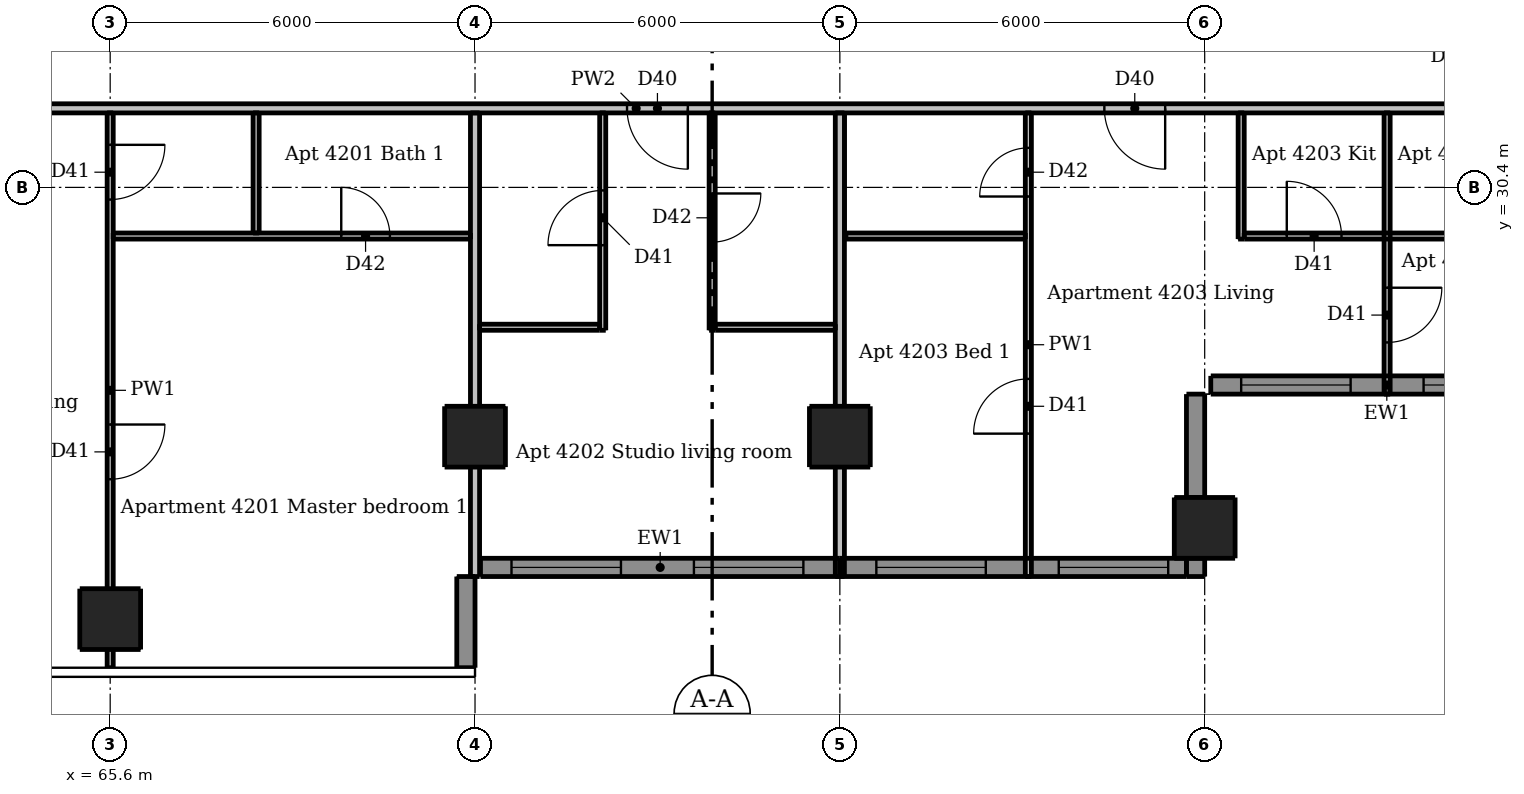
"""IFC4 building model, lengths in metres.
Left out: names, types, materials, properties, quantities, classifications, styles, units other than length and angle.
Written with IfcOpenShell. Run it as: python <this file> out.ifc"""

import sys

from ifc_helpers import new_model, si_unit, direction, frame, frame_2d, origin, origin_2d, place, context, subcontext, project, spatial, rectangle, extrude, element, fill, save


model = new_model("IFC4")
c1 = context("Model", 3, precision=1e-05, world=origin(), true_north=direction((0.0, 1.0)))
c2 = subcontext(c1, "Body", "Model", "MODEL_VIEW")
j1 = project(units=[si_unit("LENGTHUNIT", "METRE"), si_unit("PLANEANGLEUNIT", "RADIAN")], contexts=[c1])
p1 = place(None, origin())
s1 = spatial("IfcSite", under=j1, at=p1, CompositionType="ELEMENT")
p2 = place(p1, origin())
s2 = spatial("IfcBuilding", under=s1, at=p2, CompositionType="ELEMENT")
p3 = place(p2, frame((0.0, 0.0, 158.2)))
s3 = spatial("IfcBuildingStorey", under=s2, at=p3, CompositionType="ELEMENT", Elevation=158.2)
for number, where, z_axis, x_axis in (
    (1, (65.6, 23.3, 0.0), (0.0, 0.0, 1.0), (1.0, 0.0, 0.0)),
    (2, (71.6, 26.3, 0.0), (0.0, 0.0, 1.0), (1.0, 0.0, 0.0)),
    (3, (77.6, 26.3, 0.0), (0.0, 0.0, 1.0), (1.0, 0.0, 0.0)),
    (4, (83.6, 24.8, 0.0), (0.0, 0.0, 1.0), (1.0, 0.0, 0.0)),
):
    element("IfcColumn", number, at=place(p3, frame(where, z_axis=z_axis, x_axis=x_axis)), inside=s3, PredefinedType="COLUMN", context=c2, shape_type="SweptSolid", body=[
        extrude(rectangle(XDim=1.0, YDim=1.0, at=origin_2d()), origin(), (0.0, 0.0, 1.0), 3.05),
    ])
p4 = place(p3, frame((71.45, 22.5, 0.0), z_axis=(0.0, 0.0, 1.0), x_axis=(0.0, 1.0, 0.0)))
e5 = element("IfcWall", 5, at=p4, inside=s3, PredefinedType="SOLIDWALL", context=c2, shape_type="SweptSolid", body=[
    extrude(rectangle(XDim=1.5, YDim=0.3, at=frame_2d((0.75, 0.0))), origin(), (0.0, 0.0, 1.0), 3.05),
])
p5 = place(p3, frame((83.45, 24.0, 0.0), z_axis=(0.0, 0.0, 1.0), x_axis=(0.0, 1.0, 0.0)))
e6 = element("IfcWall", 6, at=p5, inside=s3, PredefinedType="SOLIDWALL", context=c2, shape_type="SweptSolid", body=[
    extrude(rectangle(XDim=0.3, YDim=0.3, at=frame_2d((0.15, 0.0))), origin(), (0.0, 0.0, 1.0), 3.05),
])
p6 = place(p3, frame((83.45, 25.3, 0.0), z_axis=(0.0, 0.0, 1.0), x_axis=(0.0, 1.0, 0.0)))
e7 = element("IfcWall", 7, at=p6, inside=s3, PredefinedType="SOLIDWALL", context=c2, shape_type="SweptSolid", body=[
    extrude(rectangle(XDim=1.7, YDim=0.3, at=frame_2d((0.85, 0.0))), origin(), (0.0, 0.0, 1.0), 3.05),
])
p7 = place(p3, frame((71.69, 24.15, 0.0), z_axis=(0.0, 0.0, 1.0), x_axis=(1.0, 0.0, 0.0)))
e8 = element("IfcWall", 8, at=p7, inside=s3, PredefinedType="SOLIDWALL", context=c2, shape_type="SweptSolid", body=[
    extrude(rectangle(XDim=5.91, YDim=0.3, at=frame_2d((2.955, 0.0))), origin(), (0.0, 0.0, 1.0), 3.05),
])
p8 = place(p7, frame((0.51, 0.0, 0.15)))
e9 = element("IfcOpeningElement", 9, at=p8, cuts=e8, PredefinedType="OPENING", context=c2, shape_type="SweptSolid", body=[
    extrude(rectangle(XDim=1.8, YDim=2.1, at=frame_2d((0.9, 1.05))), frame((0.0, 0.16, 0.0), z_axis=(0.0, -1.0, 0.0), x_axis=(1.0, 0.0, 0.0)), (0.0, 0.0, 1.0), 0.32),
])
p9 = place(p7, frame((3.51, 0.0, 0.15)))
e10 = element("IfcOpeningElement", 10, at=p9, cuts=e8, PredefinedType="OPENING", context=c2, shape_type="SweptSolid", body=[
    extrude(rectangle(XDim=1.8, YDim=2.1, at=frame_2d((0.9, 1.05))), frame((0.0, 0.16, 0.0), z_axis=(0.0, -1.0, 0.0), x_axis=(1.0, 0.0, 0.0)), (0.0, 0.0, 1.0), 0.32),
])
p10 = place(p3, frame((77.6, 24.15, 0.0), z_axis=(0.0, 0.0, 1.0), x_axis=(1.0, 0.0, 0.0)))
e11 = element("IfcWall", 11, at=p10, inside=s3, PredefinedType="SOLIDWALL", context=c2, shape_type="SweptSolid", body=[
    extrude(rectangle(XDim=5.7, YDim=0.3, at=frame_2d((2.85, 0.0))), origin(), (0.0, 0.0, 1.0), 3.05),
])
p11 = place(p10, frame((0.6, 0.0, 0.15)))
e12 = element("IfcOpeningElement", 12, at=p11, cuts=e11, PredefinedType="OPENING", context=c2, shape_type="SweptSolid", body=[
    extrude(rectangle(XDim=1.8, YDim=2.1, at=frame_2d((0.9, 1.05))), frame((0.0, 0.16, 0.0), z_axis=(0.0, -1.0, 0.0), x_axis=(1.0, 0.0, 0.0)), (0.0, 0.0, 1.0), 0.32),
])
p12 = place(p10, frame((3.6, 0.0, 0.15)))
e13 = element("IfcOpeningElement", 13, at=p12, cuts=e11, PredefinedType="OPENING", context=c2, shape_type="SweptSolid", body=[
    extrude(rectangle(XDim=1.8, YDim=2.1, at=frame_2d((0.9, 1.05))), frame((0.0, 0.16, 0.0), z_axis=(0.0, -1.0, 0.0), x_axis=(1.0, 0.0, 0.0)), (0.0, 0.0, 1.0), 0.32),
])
p13 = place(p3, frame((83.7, 27.15, 0.0), z_axis=(0.0, 0.0, 1.0), x_axis=(1.0, 0.0, 0.0)))
e14 = element("IfcWall", 14, at=p13, inside=s3, PredefinedType="SOLIDWALL", context=c2, shape_type="SweptSolid", body=[
    extrude(rectangle(XDim=5.79, YDim=0.3, at=frame_2d((2.895, 0.0))), origin(), (0.0, 0.0, 1.0), 3.05),
])
p14 = place(p13, frame((0.5, 0.0, 0.15)))
e15 = element("IfcOpeningElement", 15, at=p14, cuts=e14, PredefinedType="OPENING", context=c2, shape_type="SweptSolid", body=[
    extrude(rectangle(XDim=1.8, YDim=2.1, at=frame_2d((0.9, 1.05))), frame((0.0, 0.16, 0.0), z_axis=(0.0, -1.0, 0.0), x_axis=(1.0, 0.0, 0.0)), (0.0, 0.0, 1.0), 0.32),
])
p15 = place(p13, frame((3.5, 0.0, 0.15)))
e16 = element("IfcOpeningElement", 16, at=p15, cuts=e14, PredefinedType="OPENING", context=c2, shape_type="SweptSolid", body=[
    extrude(rectangle(XDim=1.8, YDim=2.1, at=frame_2d((0.9, 1.05))), frame((0.0, 0.16, 0.0), z_axis=(0.0, -1.0, 0.0), x_axis=(1.0, 0.0, 0.0)), (0.0, 0.0, 1.0), 0.32),
])
p16 = place(p3, frame((65.6, 31.625, 0.0), z_axis=(0.0, 0.0, 1.0), x_axis=(0.0, -1.0, 0.0)))
e17 = element("IfcWall", 17, at=p16, inside=s3, PredefinedType="PARTITIONING", context=c2, shape_type="SweptSolid", body=[
    extrude(rectangle(XDim=9.125, YDim=0.1, at=frame_2d((4.562, 0.0))), origin(), (0.0, 0.0, 1.0), 2.516),
])
p17 = place(p16, frame((0.525, 0.0, 0.0)))
e18 = element("IfcOpeningElement", 18, at=p17, cuts=e17, PredefinedType="OPENING", context=c2, shape_type="SweptSolid", body=[
    extrude(rectangle(XDim=0.9, YDim=2.1, at=frame_2d((0.45, 1.05))), frame((0.0, 0.06, 0.0), z_axis=(0.0, -1.0, 0.0), x_axis=(1.0, 0.0, 0.0)), (0.0, 0.0, 1.0), 0.12),
])
p18 = place(p16, frame((5.125, 0.0, 0.0)))
e19 = element("IfcOpeningElement", 19, at=p18, cuts=e17, PredefinedType="OPENING", context=c2, shape_type="SweptSolid", body=[
    extrude(rectangle(XDim=0.9, YDim=2.1, at=frame_2d((0.45, 1.05))), frame((0.0, 0.06, 0.0), z_axis=(0.0, -1.0, 0.0), x_axis=(1.0, 0.0, 0.0)), (0.0, 0.0, 1.0), 0.12),
])
p19 = place(p3, frame((68.0, 29.65, 0.0), z_axis=(0.0, 0.0, 1.0), x_axis=(0.0, 1.0, 0.0)))
e20 = element("IfcWall", 20, at=p19, inside=s3, PredefinedType="PARTITIONING", context=c2, shape_type="SweptSolid", body=[
    extrude(rectangle(XDim=1.975, YDim=0.1, at=frame_2d((0.988, 0.0))), origin(), (0.0, 0.0, 1.0), 3.05),
])
p20 = place(p3, frame((73.7, 28.05, 0.0), z_axis=(0.0, 0.0, 1.0), x_axis=(0.0, 1.0, 0.0)))
e21 = element("IfcWall", 21, at=p20, inside=s3, PredefinedType="PARTITIONING", context=c2, shape_type="SweptSolid", body=[
    extrude(rectangle(XDim=3.575, YDim=0.1, at=frame_2d((1.788, 0.0))), origin(), (0.0, 0.0, 1.0), 3.05),
])
p21 = place(p20, frame((1.4, 0.0, 0.0)))
e22 = element("IfcOpeningElement", 22, at=p21, cuts=e21, PredefinedType="OPENING", context=c2, shape_type="SweptSolid", body=[
    extrude(rectangle(XDim=0.9, YDim=2.1, at=frame_2d((0.45, 1.05))), frame((0.0, 0.06, 0.0), z_axis=(0.0, -1.0, 0.0), x_axis=(1.0, 0.0, 0.0)), (0.0, 0.0, 1.0), 0.12),
])
p22 = place(p3, frame((75.5, 31.625, 0.0), z_axis=(0.0, 0.0, 1.0), x_axis=(0.0, -1.0, 0.0)))
e23 = element("IfcWall", 23, at=p22, inside=s3, PredefinedType="PARTITIONING", context=c2, shape_type="SweptSolid", body=[
    extrude(rectangle(XDim=3.575, YDim=0.1, at=frame_2d((1.788, 0.0))), origin(), (0.0, 0.0, 1.0), 3.05),
])
p23 = place(p22, frame((1.325, 0.0, 0.0)))
e24 = element("IfcOpeningElement", 24, at=p23, cuts=e23, PredefinedType="OPENING", context=c2, shape_type="SweptSolid", body=[
    extrude(rectangle(XDim=0.8, YDim=2.1, at=frame_2d((0.4, 1.05))), frame((0.0, 0.06, 0.0), z_axis=(0.0, -1.0, 0.0), x_axis=(1.0, 0.0, 0.0)), (0.0, 0.0, 1.0), 0.12),
])
p24 = place(p3, frame((80.7, 24.0, 0.0), z_axis=(0.0, 0.0, 1.0), x_axis=(0.0, 1.0, 0.0)))
e25 = element("IfcWall", 25, at=p24, inside=s3, PredefinedType="PARTITIONING", context=c2, shape_type="SweptSolid", body=[
    extrude(rectangle(XDim=7.625, YDim=0.1, at=frame_2d((3.812, 0.0))), origin(), (0.0, 0.0, 1.0), 3.05),
])
p25 = place(p24, frame((2.35, 0.0, 0.0)))
e26 = element("IfcOpeningElement", 26, at=p25, cuts=e25, PredefinedType="OPENING", context=c2, shape_type="SweptSolid", body=[
    extrude(rectangle(XDim=0.9, YDim=2.1, at=frame_2d((0.45, 1.05))), frame((0.0, 0.06, 0.0), z_axis=(0.0, -1.0, 0.0), x_axis=(1.0, 0.0, 0.0)), (0.0, 0.0, 1.0), 0.12),
])
p26 = place(p24, frame((6.25, 0.0, 0.0)))
e27 = element("IfcOpeningElement", 27, at=p26, cuts=e25, PredefinedType="OPENING", context=c2, shape_type="SweptSolid", body=[
    extrude(rectangle(XDim=0.8, YDim=2.1, at=frame_2d((0.4, 1.05))), frame((0.0, 0.06, 0.0), z_axis=(0.0, -1.0, 0.0), x_axis=(1.0, 0.0, 0.0)), (0.0, 0.0, 1.0), 0.12),
])
p27 = place(p3, frame((84.2, 29.55, 0.0), z_axis=(0.0, 0.0, 1.0), x_axis=(0.0, 1.0, 0.0)))
e28 = element("IfcWall", 28, at=p27, inside=s3, PredefinedType="PARTITIONING", context=c2, shape_type="SweptSolid", body=[
    extrude(rectangle(XDim=2.075, YDim=0.1, at=frame_2d((1.038, 0.0))), origin(), (0.0, 0.0, 1.0), 3.05),
])
p28 = place(p3, frame((86.6, 31.625, 0.0), z_axis=(0.0, 0.0, 1.0), x_axis=(0.0, -1.0, 0.0)))
e29 = element("IfcWall", 29, at=p28, inside=s3, PredefinedType="PARTITIONING", context=c2, shape_type="SweptSolid", body=[
    extrude(rectangle(XDim=4.625, YDim=0.1, at=frame_2d((2.312, 0.0))), origin(), (0.0, 0.0, 1.0), 3.05),
])
p29 = place(p28, frame((2.875, 0.0, 0.0)))
e30 = element("IfcOpeningElement", 30, at=p29, cuts=e29, PredefinedType="OPENING", context=c2, shape_type="SweptSolid", body=[
    extrude(rectangle(XDim=0.9, YDim=2.1, at=frame_2d((0.45, 1.05))), frame((0.0, 0.06, 0.0), z_axis=(0.0, -1.0, 0.0), x_axis=(1.0, 0.0, 0.0)), (0.0, 0.0, 1.0), 0.12),
])
p30 = place(p3, frame((65.65, 29.6, 0.0), z_axis=(0.0, 0.0, 1.0), x_axis=(1.0, 0.0, 0.0)))
e31 = element("IfcWall", 31, at=p30, inside=s3, PredefinedType="PARTITIONING", context=c2, shape_type="SweptSolid", body=[
    extrude(rectangle(XDim=5.875, YDim=0.1, at=frame_2d((2.938, 0.0))), origin(), (0.0, 0.0, 1.0), 3.05),
])
p31 = place(p30, frame((3.75, 0.0, 0.0)))
e32 = element("IfcOpeningElement", 32, at=p31, cuts=e31, PredefinedType="OPENING", context=c2, shape_type="SweptSolid", body=[
    extrude(rectangle(XDim=0.8, YDim=2.1, at=frame_2d((0.4, 1.05))), frame((0.0, 0.06, 0.0), z_axis=(0.0, -1.0, 0.0), x_axis=(1.0, 0.0, 0.0)), (0.0, 0.0, 1.0), 0.12),
])
p32 = place(p3, frame((77.7, 29.6, 0.0), z_axis=(0.0, 0.0, 1.0), x_axis=(1.0, 0.0, 0.0)))
e33 = element("IfcWall", 33, at=p32, inside=s3, PredefinedType="PARTITIONING", context=c2, shape_type="SweptSolid", body=[
    extrude(rectangle(XDim=2.95, YDim=0.1, at=frame_2d((1.475, 0.0))), origin(), (0.0, 0.0, 1.0), 3.05),
])
p33 = place(p3, frame((84.25, 29.6, 0.0), z_axis=(0.0, 0.0, 1.0), x_axis=(1.0, 0.0, 0.0)))
e34 = element("IfcWall", 34, at=p33, inside=s3, PredefinedType="PARTITIONING", context=c2, shape_type="SweptSolid", body=[
    extrude(rectangle(XDim=5.275, YDim=0.1, at=frame_2d((2.637, 0.0))), origin(), (0.0, 0.0, 1.0), 3.05),
])
p34 = place(p33, frame((0.7, 0.0, 0.0)))
e35 = element("IfcOpeningElement", 35, at=p34, cuts=e34, PredefinedType="OPENING", context=c2, shape_type="SweptSolid", body=[
    extrude(rectangle(XDim=0.9, YDim=2.1, at=frame_2d((0.45, 1.05))), frame((0.0, 0.06, 0.0), z_axis=(0.0, -1.0, 0.0), x_axis=(1.0, 0.0, 0.0)), (0.0, 0.0, 1.0), 0.12),
])
p35 = place(p33, frame((3.45, 0.0, 0.0)))
e36 = element("IfcOpeningElement", 36, at=p35, cuts=e34, PredefinedType="OPENING", context=c2, shape_type="SweptSolid", body=[
    extrude(rectangle(XDim=0.8, YDim=2.1, at=frame_2d((0.4, 1.05))), frame((0.0, 0.06, 0.0), z_axis=(0.0, -1.0, 0.0), x_axis=(1.0, 0.0, 0.0)), (0.0, 0.0, 1.0), 0.12),
])
for number, where, z_axis, x_axis in (
    (37, (71.675, 28.1, 0.0), (0.0, 0.0, 1.0), (1.0, 0.0, 0.0)),
    (38, (75.55, 28.1, 0.0), (0.0, 0.0, 1.0), (1.0, 0.0, 0.0)),
):
    element("IfcWall", number, at=place(p3, frame(where, z_axis=z_axis, x_axis=x_axis)), inside=s3, PredefinedType="PARTITIONING", context=c2, shape_type="SweptSolid", body=[
        extrude(rectangle(XDim=1.975, YDim=0.1, at=frame_2d((0.987, 0.0))), origin(), (0.0, 0.0, 1.0), 3.05),
    ])
for number, where, z_axis, x_axis in (
    (39, (71.6, 24.0, 0.0), (0.0, 0.0, 1.0), (0.0, 1.0, 0.0)),
    (40, (77.6, 24.0, 0.0), (0.0, 0.0, 1.0), (0.0, 1.0, 0.0)),
):
    element("IfcWall", number, at=place(p3, frame(where, z_axis=z_axis, x_axis=x_axis)), inside=s3, PredefinedType="PARTITIONING", context=c2, shape_type="SweptSolid", body=[
        extrude(rectangle(XDim=7.625, YDim=0.15, at=frame_2d((3.812, 0.0))), origin(), (0.0, 0.0, 1.0), 2.59),
    ])
p36 = place(p3, frame((89.525, 31.7, 0.0), z_axis=(0.0, 0.0, 1.0), x_axis=(-1.0, 0.0, 0.0)))
e41 = element("IfcWall", 41, at=p36, inside=s3, PredefinedType="PARTITIONING", context=c2, shape_type="SweptSolid", body=[
    extrude(rectangle(XDim=30.55, YDim=0.15, at=frame_2d((15.275, 0.0))), origin(), (0.0, 0.0, 1.0), 3.05),
])
p37 = place(p36, frame((26.775, 0.0, 0.0)))
e42 = element("IfcOpeningElement", 42, at=p37, cuts=e41, PredefinedType="OPENING", context=c2, shape_type="SweptSolid", body=[
    extrude(rectangle(XDim=1.0, YDim=2.1, at=frame_2d((0.5, 1.05))), frame((0.0, 0.085, 0.0), z_axis=(0.0, -1.0, 0.0), x_axis=(1.0, 0.0, 0.0)), (0.0, 0.0, 1.0), 0.17),
])
p38 = place(p36, frame((14.425, 0.0, 0.0)))
e43 = element("IfcOpeningElement", 43, at=p38, cuts=e41, PredefinedType="OPENING", context=c2, shape_type="SweptSolid", body=[
    extrude(rectangle(XDim=1.0, YDim=2.1, at=frame_2d((0.5, 1.05))), frame((0.0, 0.085, 0.0), z_axis=(0.0, -1.0, 0.0), x_axis=(1.0, 0.0, 0.0)), (0.0, 0.0, 1.0), 0.17),
])
p39 = place(p36, frame((6.575, 0.0, 0.0)))
e44 = element("IfcOpeningElement", 44, at=p39, cuts=e41, PredefinedType="OPENING", context=c2, shape_type="SweptSolid", body=[
    extrude(rectangle(XDim=1.0, YDim=2.1, at=frame_2d((0.5, 1.05))), frame((0.0, 0.085, 0.0), z_axis=(0.0, -1.0, 0.0), x_axis=(1.0, 0.0, 0.0)), (0.0, 0.0, 1.0), 0.17),
])
p40 = place(p8, origin())
e45 = element("IfcWindow", 45, at=p40, inside=s3, PartitioningType="DOUBLE_PANEL_VERTICAL", PredefinedType="WINDOW", context=c2, shape_type="SweptSolid", body=[
    extrude(rectangle(XDim=1.8, YDim=2.1, at=frame_2d((0.9, 1.05))), frame((0.0, 0.03, 0.0), z_axis=(0.0, -1.0, 0.0), x_axis=(1.0, 0.0, 0.0)), (0.0, 0.0, 1.0), 0.06),
])
fill(e9, e45)
p41 = place(p9, origin())
e46 = element("IfcWindow", 46, at=p41, inside=s3, PartitioningType="DOUBLE_PANEL_VERTICAL", PredefinedType="WINDOW", context=c2, shape_type="SweptSolid", body=[
    extrude(rectangle(XDim=1.8, YDim=2.1, at=frame_2d((0.9, 1.05))), frame((0.0, 0.03, 0.0), z_axis=(0.0, -1.0, 0.0), x_axis=(1.0, 0.0, 0.0)), (0.0, 0.0, 1.0), 0.06),
])
fill(e10, e46)
p42 = place(p11, origin())
e47 = element("IfcWindow", 47, at=p42, inside=s3, PartitioningType="DOUBLE_PANEL_VERTICAL", PredefinedType="WINDOW", context=c2, shape_type="SweptSolid", body=[
    extrude(rectangle(XDim=1.8, YDim=2.1, at=frame_2d((0.9, 1.05))), frame((0.0, 0.03, 0.0), z_axis=(0.0, -1.0, 0.0), x_axis=(1.0, 0.0, 0.0)), (0.0, 0.0, 1.0), 0.06),
])
fill(e12, e47)
p43 = place(p12, origin())
e48 = element("IfcWindow", 48, at=p43, inside=s3, PartitioningType="DOUBLE_PANEL_VERTICAL", PredefinedType="WINDOW", context=c2, shape_type="SweptSolid", body=[
    extrude(rectangle(XDim=1.8, YDim=2.1, at=frame_2d((0.9, 1.05))), frame((0.0, 0.03, 0.0), z_axis=(0.0, -1.0, 0.0), x_axis=(1.0, 0.0, 0.0)), (0.0, 0.0, 1.0), 0.06),
])
fill(e13, e48)
p44 = place(p14, origin())
e49 = element("IfcWindow", 49, at=p44, inside=s3, PartitioningType="DOUBLE_PANEL_VERTICAL", PredefinedType="WINDOW", context=c2, shape_type="SweptSolid", body=[
    extrude(rectangle(XDim=1.8, YDim=2.1, at=frame_2d((0.9, 1.05))), frame((0.0, 0.03, 0.0), z_axis=(0.0, -1.0, 0.0), x_axis=(1.0, 0.0, 0.0)), (0.0, 0.0, 1.0), 0.06),
])
fill(e15, e49)
p45 = place(p15, origin())
e50 = element("IfcWindow", 50, at=p45, inside=s3, PartitioningType="DOUBLE_PANEL_VERTICAL", PredefinedType="WINDOW", context=c2, shape_type="SweptSolid", body=[
    extrude(rectangle(XDim=1.8, YDim=2.1, at=frame_2d((0.9, 1.05))), frame((0.0, 0.03, 0.0), z_axis=(0.0, -1.0, 0.0), x_axis=(1.0, 0.0, 0.0)), (0.0, 0.0, 1.0), 0.06),
])
fill(e16, e50)
p46 = place(p17, origin())
e51 = element("IfcDoor", 51, at=p46, inside=s3, OperationType="SINGLE_SWING_LEFT", PredefinedType="DOOR", context=c2, shape_type="SweptSolid", body=[
    extrude(rectangle(XDim=0.9, YDim=2.1, at=frame_2d((0.45, 1.05))), frame((0.0, 0.025, 0.0), z_axis=(0.0, -1.0, 0.0), x_axis=(1.0, 0.0, 0.0)), (0.0, 0.0, 1.0), 0.05),
])
fill(e18, e51)
p47 = place(p18, origin())
e52 = element("IfcDoor", 52, at=p47, inside=s3, OperationType="SINGLE_SWING_LEFT", PredefinedType="DOOR", context=c2, shape_type="SweptSolid", body=[
    extrude(rectangle(XDim=0.9, YDim=2.1, at=frame_2d((0.45, 1.05))), frame((0.0, 0.025, 0.0), z_axis=(0.0, -1.0, 0.0), x_axis=(1.0, 0.0, 0.0)), (0.0, 0.0, 1.0), 0.05),
])
fill(e19, e52)
p48 = place(p31, origin())
e53 = element("IfcDoor", 53, at=p48, inside=s3, OperationType="SINGLE_SWING_LEFT", PredefinedType="DOOR", context=c2, shape_type="SweptSolid", body=[
    extrude(rectangle(XDim=0.8, YDim=2.1, at=frame_2d((0.4, 1.05))), frame((0.0, 0.025, 0.0), z_axis=(0.0, -1.0, 0.0), x_axis=(1.0, 0.0, 0.0)), (0.0, 0.0, 1.0), 0.05),
])
fill(e32, e53)
p49 = place(p38, origin())
e54 = element("IfcDoor", 54, at=p49, inside=s3, OperationType="SINGLE_SWING_LEFT", PredefinedType="DOOR", context=c2, shape_type="SweptSolid", body=[
    extrude(rectangle(XDim=1.0, YDim=2.1, at=frame_2d((0.5, 1.05))), frame((0.0, 0.025, 0.0), z_axis=(0.0, -1.0, 0.0), x_axis=(1.0, 0.0, 0.0)), (0.0, 0.0, 1.0), 0.05),
])
fill(e43, e54)
p50 = place(p21, origin())
e55 = element("IfcDoor", 55, at=p50, inside=s3, OperationType="SINGLE_SWING_LEFT", PredefinedType="DOOR", context=c2, shape_type="SweptSolid", body=[
    extrude(rectangle(XDim=0.9, YDim=2.1, at=frame_2d((0.45, 1.05))), frame((0.0, 0.025, 0.0), z_axis=(0.0, -1.0, 0.0), x_axis=(1.0, 0.0, 0.0)), (0.0, 0.0, 1.0), 0.05),
])
fill(e22, e55)
p51 = place(p23, origin())
e56 = element("IfcDoor", 56, at=p51, inside=s3, OperationType="SINGLE_SWING_LEFT", PredefinedType="DOOR", context=c2, shape_type="SweptSolid", body=[
    extrude(rectangle(XDim=0.8, YDim=2.1, at=frame_2d((0.4, 1.05))), frame((0.0, 0.025, 0.0), z_axis=(0.0, -1.0, 0.0), x_axis=(1.0, 0.0, 0.0)), (0.0, 0.0, 1.0), 0.05),
])
fill(e24, e56)
p52 = place(p39, origin())
e57 = element("IfcDoor", 57, at=p52, inside=s3, OperationType="SINGLE_SWING_LEFT", PredefinedType="DOOR", context=c2, shape_type="SweptSolid", body=[
    extrude(rectangle(XDim=1.0, YDim=2.1, at=frame_2d((0.5, 1.05))), frame((0.0, 0.025, 0.0), z_axis=(0.0, -1.0, 0.0), x_axis=(1.0, 0.0, 0.0)), (0.0, 0.0, 1.0), 0.05),
])
fill(e44, e57)
p53 = place(p34, origin())
e58 = element("IfcDoor", 58, at=p53, inside=s3, OperationType="SINGLE_SWING_LEFT", PredefinedType="DOOR", context=c2, shape_type="SweptSolid", body=[
    extrude(rectangle(XDim=0.9, YDim=2.1, at=frame_2d((0.45, 1.05))), frame((0.0, 0.025, 0.0), z_axis=(0.0, -1.0, 0.0), x_axis=(1.0, 0.0, 0.0)), (0.0, 0.0, 1.0), 0.05),
])
fill(e35, e58)
p54 = place(p25, origin())
e59 = element("IfcDoor", 59, at=p54, inside=s3, OperationType="SINGLE_SWING_LEFT", PredefinedType="DOOR", context=c2, shape_type="SweptSolid", body=[
    extrude(rectangle(XDim=0.9, YDim=2.1, at=frame_2d((0.45, 1.05))), frame((0.0, 0.025, 0.0), z_axis=(0.0, -1.0, 0.0), x_axis=(1.0, 0.0, 0.0)), (0.0, 0.0, 1.0), 0.05),
])
fill(e26, e59)
p55 = place(p26, origin())
e60 = element("IfcDoor", 60, at=p55, inside=s3, OperationType="SINGLE_SWING_LEFT", PredefinedType="DOOR", context=c2, shape_type="SweptSolid", body=[
    extrude(rectangle(XDim=0.8, YDim=2.1, at=frame_2d((0.4, 1.05))), frame((0.0, 0.025, 0.0), z_axis=(0.0, -1.0, 0.0), x_axis=(1.0, 0.0, 0.0)), (0.0, 0.0, 1.0), 0.05),
])
fill(e27, e60)
p56 = place(p29, origin())
e61 = element("IfcDoor", 61, at=p56, inside=s3, OperationType="SINGLE_SWING_LEFT", PredefinedType="DOOR", context=c2, shape_type="SweptSolid", body=[
    extrude(rectangle(XDim=0.9, YDim=2.1, at=frame_2d((0.45, 1.05))), frame((0.0, 0.025, 0.0), z_axis=(0.0, -1.0, 0.0), x_axis=(1.0, 0.0, 0.0)), (0.0, 0.0, 1.0), 0.05),
])
fill(e30, e61)
save(model, sys.argv[1])
